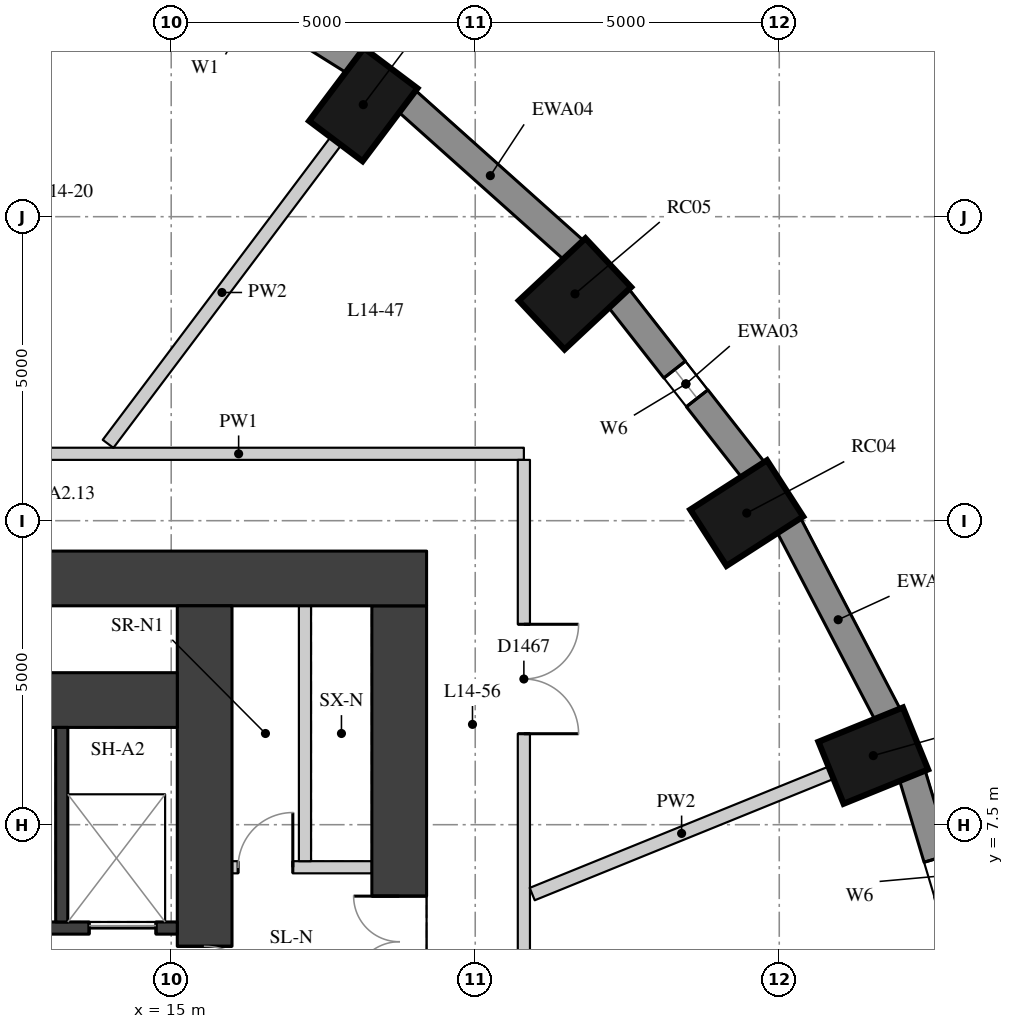
"""IFC4 building model, lengths in metres.
Left out: names, types, materials, properties, quantities, classifications, styles, units other than length and angle.
Written with IfcOpenShell. Run it as: python <this file> out.ifc"""

import sys

from ifc_helpers import new_model, si_unit, direction, frame, frame_2d, origin, origin_2d, place, context, subcontext, project, spatial, rectangle, extrude, element, fill, save


model = new_model("IFC4")
c1 = context("Model", 3, precision=1e-05, world=origin(), true_north=direction((0.0, 1.0)))
c2 = subcontext(c1, "Body", "Model", "MODEL_VIEW")
j1 = project(units=[si_unit("LENGTHUNIT", "METRE"), si_unit("PLANEANGLEUNIT", "RADIAN")], contexts=[c1])
p1 = place(None, origin())
s1 = spatial("IfcSite", under=j1, at=p1, CompositionType="ELEMENT")
p2 = place(p1, origin())
s2 = spatial("IfcBuilding", under=s1, at=p2, CompositionType="ELEMENT")
p3 = place(p2, frame((0.0, 0.0, 54.7)))
s3 = spatial("IfcBuildingStorey", under=s2, at=p3, CompositionType="ELEMENT", Elevation=54.7)
for number, where, z_axis, x_axis in (
    (1, (26.546, 8.636, 0.0), (0.0, 0.0, 1.0), (0.927, 0.376, 0.0)),
    (2, (24.465, 12.625, 0.0), (0.0, 0.0, 1.0), (0.841, 0.541, 0.0)),
    (3, (21.641, 16.23, 0.0), (0.0, 0.0, 1.0), (0.73, 0.683, 0.0)),
    (4, (18.159, 19.343, 0.0), (0.0, 0.0, 1.0), (0.601, 0.799, 0.0)),
):
    element("IfcColumn", number, at=place(p3, frame(where, z_axis=z_axis, x_axis=x_axis)), inside=s3, PredefinedType="COLUMN", context=c2, shape_type="SweptSolid", body=[
        extrude(rectangle(XDim=1.5, YDim=1.1, at=origin_2d()), origin(), (0.0, 0.0, 1.0), 3.3),
    ])
p4 = place(p3, frame((28.182, 4.996, 0.0), z_axis=(0.0, 0.0, 1.0), x_axis=(-0.287064133733, 0.957911364963, 0.0)))
e5 = element("IfcWall", 5, at=p4, inside=s3, PredefinedType="SOLIDWALL", context=c2, shape_type="SweptSolid", body=[
    extrude(rectangle(XDim=3.473, YDim=0.45, at=frame_2d((1.737, 0.0))), origin(), (0.0, 0.0, 1.0), 3.02),
])
p5 = place(p4, frame((1.437, 0.0, 0.4)))
e6 = element("IfcOpeningElement", 6, at=p5, cuts=e5, PredefinedType="OPENING", context=c2, shape_type="SweptSolid", body=[
    extrude(rectangle(XDim=0.6, YDim=1.75, at=frame_2d((0.3, 0.875))), frame((0.0, 0.235, 0.0), z_axis=(0.0, -1.0, 0.0), x_axis=(1.0, 0.0, 0.0)), (0.0, 0.0, 1.0), 0.47),
])
p6 = place(p3, frame((26.786, 9.305, 0.0), z_axis=(0.0, 0.0, 1.0), x_axis=(-0.462492775226, 0.886623050041, 0.0)))
e7 = element("IfcWall", 7, at=p6, inside=s3, PredefinedType="SOLIDWALL", context=c2, shape_type="SweptSolid", body=[
    extrude(rectangle(XDim=3.532, YDim=0.45, at=frame_2d((1.766, 0.0))), origin(), (0.0, 0.0, 1.0), 3.02),
])
p7 = place(p3, frame((24.578, 13.328, 0.0), z_axis=(0.0, 0.0, 1.0), x_axis=(-0.616661975264, 0.787228053529, 0.0)))
e8 = element("IfcWall", 8, at=p7, inside=s3, PredefinedType="SOLIDWALL", context=c2, shape_type="SweptSolid", body=[
    extrude(rectangle(XDim=3.61, YDim=0.45, at=frame_2d((1.805, 0.0))), origin(), (0.0, 0.0, 1.0), 3.02),
])
p8 = place(p7, frame((1.505, 0.0, 0.4)))
e9 = element("IfcOpeningElement", 9, at=p8, cuts=e8, PredefinedType="OPENING", context=c2, shape_type="SweptSolid", body=[
    extrude(rectangle(XDim=0.6, YDim=1.75, at=frame_2d((0.3, 0.875))), frame((0.0, 0.235, 0.0), z_axis=(0.0, -1.0, 0.0), x_axis=(1.0, 0.0, 0.0)), (0.0, 0.0, 1.0), 0.47),
])
p9 = place(p3, frame((21.627, 16.943, 0.0), z_axis=(0.0, 0.0, 1.0), x_axis=(-0.745526233716, 0.66647628228, 0.0)))
e10 = element("IfcWall", 10, at=p9, inside=s3, PredefinedType="SOLIDWALL", context=c2, shape_type="SweptSolid", body=[
    extrude(rectangle(XDim=3.697, YDim=0.45, at=frame_2d((1.848, 0.0))), origin(), (0.0, 0.0, 1.0), 3.02),
])
p10 = place(p3, frame((18.023, 20.044, 0.0), z_axis=(0.0, 0.0, 1.0), x_axis=(-0.847635480093, 0.530579016629, 0.0)))
e11 = element("IfcWall", 11, at=p10, inside=s3, PredefinedType="SOLIDWALL", context=c2, shape_type="SweptSolid", body=[
    extrude(rectangle(XDim=3.782, YDim=0.45, at=frame_2d((1.891, 0.0))), origin(), (0.0, 0.0, 1.0), 3.02),
])
p11 = place(p10, frame((0.791, 0.0, 0.4)))
e12 = element("IfcOpeningElement", 12, at=p11, cuts=e11, PredefinedType="OPENING", context=c2, shape_type="SweptSolid", body=[
    extrude(rectangle(XDim=2.2, YDim=1.75, at=frame_2d((1.1, 0.875))), frame((0.0, 0.235, 0.0), z_axis=(0.0, -1.0, 0.0), x_axis=(1.0, 0.0, 0.0)), (0.0, 0.0, 1.0), 0.47),
])
p12 = place(p3, frame((18.75, -11.1, 0.0), z_axis=(0.0, 0.0, 1.0), x_axis=(0.0, 1.0, 0.0)))
e13 = element("IfcWall", 13, at=p12, inside=s3, PredefinedType="SHEAR", context=c2, shape_type="SweptSolid", body=[
    extrude(rectangle(XDim=22.2, YDim=0.9, at=frame_2d((11.1, 0.0))), origin(), (0.0, 0.0, 1.0), 3.02),
])
p13 = place(p12, frame((15.925, 0.0, 0.0)))
e14 = element("IfcOpeningElement", 14, at=p13, cuts=e13, PredefinedType="OPENING", context=c2, shape_type="SweptSolid", body=[
    extrude(rectangle(XDim=1.5, YDim=2.1, at=frame_2d((0.75, 1.05))), frame((0.0, 0.46, 0.0), z_axis=(0.0, -1.0, 0.0), x_axis=(1.0, 0.0, 0.0)), (0.0, 0.0, 1.0), 0.92),
])
p14 = place(p12, frame((4.525, 0.0, 0.0)))
e15 = element("IfcOpeningElement", 15, at=p14, cuts=e13, PredefinedType="OPENING", context=c2, shape_type="SweptSolid", body=[
    extrude(rectangle(XDim=1.5, YDim=2.1, at=frame_2d((0.75, 1.05))), frame((0.0, 0.46, 0.0), z_axis=(0.0, -1.0, 0.0), x_axis=(1.0, 0.0, 0.0)), (0.0, 0.0, 1.0), 0.92),
])
p15 = place(p3, frame((4.0, 11.55, 0.0), z_axis=(0.0, 0.0, 1.0), x_axis=(1.0, 0.0, 0.0)))
e16 = element("IfcWall", 16, at=p15, inside=s3, PredefinedType="SHEAR", context=c2, shape_type="SweptSolid", body=[
    extrude(rectangle(XDim=15.2, YDim=0.9, at=frame_2d((7.6, 0.0))), origin(), (0.0, 0.0, 1.0), 3.02),
])
p16 = place(p3, frame((15.55, -11.1, 0.0), z_axis=(0.0, 0.0, 1.0), x_axis=(0.0, 1.0, 0.0)))
e17 = element("IfcWall", 17, at=p16, inside=s3, PredefinedType="SHEAR", context=c2, shape_type="SweptSolid", body=[
    extrude(rectangle(XDim=22.2, YDim=0.9, at=frame_2d((11.1, 0.0))), origin(), (0.0, 0.0, 1.0), 3.02),
])
p17 = place(p16, frame((15.6, 0.0, 0.0)))
e18 = element("IfcOpeningElement", 18, at=p17, cuts=e17, PredefinedType="OPENING", context=c2, shape_type="SweptSolid", body=[
    extrude(rectangle(XDim=1.0, YDim=2.1, at=frame_2d((0.5, 1.05))), frame((0.0, 0.46, 0.0), z_axis=(0.0, -1.0, 0.0), x_axis=(1.0, 0.0, 0.0)), (0.0, 0.0, 1.0), 0.92),
])
p18 = place(p16, frame((5.6, 0.0, 0.0)))
e19 = element("IfcOpeningElement", 19, at=p18, cuts=e17, PredefinedType="OPENING", context=c2, shape_type="SweptSolid", body=[
    extrude(rectangle(XDim=1.0, YDim=2.1, at=frame_2d((0.5, 1.05))), frame((0.0, 0.46, 0.0), z_axis=(0.0, -1.0, 0.0), x_axis=(1.0, 0.0, 0.0)), (0.0, 0.0, 1.0), 0.92),
])
p19 = place(p3, frame((4.9, 9.55, 0.0), z_axis=(0.0, 0.0, 1.0), x_axis=(1.0, 0.0, 0.0)))
e20 = element("IfcWall", 20, at=p19, inside=s3, PredefinedType="SHEAR", context=c2, shape_type="SweptSolid", body=[
    extrude(rectangle(XDim=10.2, YDim=0.9, at=frame_2d((5.1, 0.0))), origin(), (0.0, 0.0, 1.0), 3.02),
])
p20 = place(p3, frame((4.9, 5.8, 0.0), z_axis=(0.0, 0.0, 1.0), x_axis=(1.0, 0.0, 0.0)))
e21 = element("IfcWall", 21, at=p20, inside=s3, PredefinedType="SHEAR", context=c2, shape_type="SweptSolid", body=[
    extrude(rectangle(XDim=10.2, YDim=0.2, at=frame_2d((5.1, 0.0))), origin(), (0.0, 0.0, 1.0), 3.02),
])
p21 = place(p20, frame((6.75, 0.0, 0.0)))
e22 = element("IfcOpeningElement", 22, at=p21, cuts=e21, PredefinedType="OPENING", context=c2, shape_type="SweptSolid", body=[
    extrude(rectangle(XDim=1.1, YDim=2.1, at=frame_2d((0.55, 1.05))), frame((0.0, 0.11, 0.0), z_axis=(0.0, -1.0, 0.0), x_axis=(1.0, 0.0, 0.0)), (0.0, 0.0, 1.0), 0.22),
])
p22 = place(p20, frame((8.75, 0.0, 0.0)))
e23 = element("IfcOpeningElement", 23, at=p22, cuts=e21, PredefinedType="OPENING", context=c2, shape_type="SweptSolid", body=[
    extrude(rectangle(XDim=1.1, YDim=2.1, at=frame_2d((0.55, 1.05))), frame((0.0, 0.11, 0.0), z_axis=(0.0, -1.0, 0.0), x_axis=(1.0, 0.0, 0.0)), (0.0, 0.0, 1.0), 0.22),
])
p23 = place(p3, frame((13.2, 5.9, 0.0), z_axis=(0.0, 0.0, 1.0), x_axis=(0.0, 1.0, 0.0)))
e24 = element("IfcWall", 24, at=p23, inside=s3, PredefinedType="SHEAR", context=c2, shape_type="SweptSolid", body=[
    extrude(rectangle(XDim=3.2, YDim=0.2, at=frame_2d((1.6, 0.0))), origin(), (0.0, 0.0, 1.0), 3.02),
])
p24 = place(p3, frame((16.0, 6.8, 0.0), z_axis=(0.0, 0.0, 1.0), x_axis=(1.0, 0.0, 0.0)))
e25 = element("IfcWall", 25, at=p24, inside=s3, PredefinedType="PARTITIONING", context=c2, shape_type="SweptSolid", body=[
    extrude(rectangle(XDim=2.3, YDim=0.2, at=frame_2d((1.15, 0.0))), origin(), (0.0, 0.0, 1.0), 3.02),
])
p25 = place(p24, frame((0.1, 0.0, 0.0)))
e26 = element("IfcOpeningElement", 26, at=p25, cuts=e25, PredefinedType="OPENING", context=c2, shape_type="SweptSolid", body=[
    extrude(rectangle(XDim=0.9, YDim=2.1, at=frame_2d((0.45, 1.05))), frame((0.0, 0.11, 0.0), z_axis=(0.0, -1.0, 0.0), x_axis=(1.0, 0.0, 0.0)), (0.0, 0.0, 1.0), 0.22),
])
p26 = place(p3, frame((17.2, 6.9, 0.0), z_axis=(0.0, 0.0, 1.0), x_axis=(0.0, 1.0, 0.0)))
e27 = element("IfcWall", 27, at=p26, inside=s3, PredefinedType="PARTITIONING", context=c2, shape_type="SweptSolid", body=[
    extrude(rectangle(XDim=4.2, YDim=0.2, at=frame_2d((2.1, 0.0))), origin(), (0.0, 0.0, 1.0), 3.02),
])
p27 = place(p3, frame((11.418, 13.6, 0.0), z_axis=(0.0, 0.0, 1.0), x_axis=(1.0, 0.0, 0.0)))
e28 = element("IfcWall", 28, at=p27, inside=s3, PredefinedType="PARTITIONING", context=c2, shape_type="SweptSolid", body=[
    extrude(rectangle(XDim=9.382, YDim=0.2, at=frame_2d((4.691, 0.0))), origin(), (0.0, 0.0, 1.0), 3.02),
])
p28 = place(p3, frame((20.8, 13.5, 0.0), z_axis=(0.0, 0.0, 1.0), x_axis=(0.0, -1.0, 0.0)))
e29 = element("IfcWall", 29, at=p28, inside=s3, PredefinedType="PARTITIONING", context=c2, shape_type="SweptSolid", body=[
    extrude(rectangle(XDim=27.1, YDim=0.2, at=frame_2d((13.55, 0.0))), origin(), (0.0, 0.0, 1.0), 3.02),
])
p29 = place(p28, frame((17.733, 0.0, 0.0)))
e30 = element("IfcOpeningElement", 30, at=p29, cuts=e29, PredefinedType="OPENING", context=c2, shape_type="SweptSolid", body=[
    extrude(rectangle(XDim=1.8, YDim=2.1, at=frame_2d((0.9, 1.05))), frame((0.0, 0.11, 0.0), z_axis=(0.0, -1.0, 0.0), x_axis=(1.0, 0.0, 0.0)), (0.0, 0.0, 1.0), 0.22),
])
p30 = place(p28, frame((9.448, 0.0, 0.0)))
e31 = element("IfcOpeningElement", 31, at=p30, cuts=e29, PredefinedType="OPENING", context=c2, shape_type="SweptSolid", body=[
    extrude(rectangle(XDim=1.8, YDim=2.1, at=frame_2d((0.9, 1.05))), frame((0.0, 0.11, 0.0), z_axis=(0.0, -1.0, 0.0), x_axis=(1.0, 0.0, 0.0)), (0.0, 0.0, 1.0), 0.22),
])
p31 = place(p28, frame((2.704, 0.0, 0.0)))
e32 = element("IfcOpeningElement", 32, at=p31, cuts=e29, PredefinedType="OPENING", context=c2, shape_type="SweptSolid", body=[
    extrude(rectangle(XDim=1.8, YDim=2.1, at=frame_2d((0.9, 1.05))), frame((0.0, 0.11, 0.0), z_axis=(0.0, -1.0, 0.0), x_axis=(1.0, 0.0, 0.0)), (0.0, 0.0, 1.0), 0.22),
])
p32 = place(p3, frame((25.851, 8.354, 0.0), z_axis=(0.0, 0.0, 1.0), x_axis=(-0.926546814299, -0.376179479653, 0.0)))
e33 = element("IfcWall", 33, at=p32, inside=s3, PredefinedType="PARTITIONING", context=c2, shape_type="SweptSolid", body=[
    extrude(rectangle(XDim=5.304, YDim=0.22, at=frame_2d((2.652, 0.0))), origin(), (0.0, 0.0, 1.0), 3.02),
])
p33 = place(p3, frame((17.708, 18.743, 0.0), z_axis=(0.0, 0.0, 1.0), x_axis=(-0.601177883261, -0.799115231164, 0.0)))
e34 = element("IfcWall", 34, at=p33, inside=s3, PredefinedType="PARTITIONING", context=c2, shape_type="SweptSolid", body=[
    extrude(rectangle(XDim=6.231, YDim=0.22, at=frame_2d((3.116, 0.0))), origin(), (0.0, 0.0, 1.0), 3.02),
])
p34 = place(p5, origin())
e35 = element("IfcWindow", 35, at=p34, inside=s3, PartitioningType="SINGLE_PANEL", PredefinedType="WINDOW", context=c2, shape_type="SweptSolid", body=[
    extrude(rectangle(XDim=0.6, YDim=1.75, at=frame_2d((0.3, 0.875))), frame((0.0, 0.035, 0.0), z_axis=(0.0, -1.0, 0.0), x_axis=(1.0, 0.0, 0.0)), (0.0, 0.0, 1.0), 0.06),
])
fill(e6, e35)
p35 = place(p8, origin())
e36 = element("IfcWindow", 36, at=p35, inside=s3, PartitioningType="SINGLE_PANEL", PredefinedType="WINDOW", context=c2, shape_type="SweptSolid", body=[
    extrude(rectangle(XDim=0.6, YDim=1.75, at=frame_2d((0.3, 0.875))), frame((0.0, 0.035, 0.0), z_axis=(0.0, -1.0, 0.0), x_axis=(1.0, 0.0, 0.0)), (0.0, 0.0, 1.0), 0.06),
])
fill(e9, e36)
p36 = place(p13, origin())
e37 = element("IfcDoor", 37, at=p36, inside=s3, OperationType="DOUBLE_DOOR_SINGLE_SWING", PredefinedType="DOOR", context=c2, shape_type="SweptSolid", body=[
    extrude(rectangle(XDim=1.5, YDim=2.1, at=frame_2d((0.75, 1.05))), frame((0.0, 0.025, 0.0), z_axis=(0.0, -1.0, 0.0), x_axis=(1.0, 0.0, 0.0)), (0.0, 0.0, 1.0), 0.05),
])
fill(e14, e37)
p37 = place(p22, origin())
e38 = element("IfcDoor", 38, at=p37, inside=s3, OperationType="DOUBLE_DOOR_SLIDING", PredefinedType="DOOR", context=c2, shape_type="SweptSolid", body=[
    extrude(rectangle(XDim=1.1, YDim=2.1, at=frame_2d((0.55, 1.05))), frame((0.0, 0.025, 0.0), z_axis=(0.0, -1.0, 0.0), x_axis=(1.0, 0.0, 0.0)), (0.0, 0.0, 1.0), 0.05),
])
fill(e23, e38)
p38 = place(p17, origin())
e39 = element("IfcDoor", 39, at=p38, inside=s3, OperationType="SINGLE_SWING_RIGHT", PredefinedType="DOOR", context=c2, shape_type="SweptSolid", body=[
    extrude(rectangle(XDim=1.0, YDim=2.1, at=frame_2d((0.5, 1.05))), frame((0.0, 0.025, 0.0), z_axis=(0.0, -1.0, 0.0), x_axis=(1.0, 0.0, 0.0)), (0.0, 0.0, 1.0), 0.05),
])
fill(e18, e39)
p39 = place(p25, origin())
e40 = element("IfcDoor", 40, at=p39, inside=s3, OperationType="SINGLE_SWING_RIGHT", PredefinedType="DOOR", context=c2, shape_type="SweptSolid", body=[
    extrude(rectangle(XDim=0.9, YDim=2.1, at=frame_2d((0.45, 1.05))), frame((0.0, 0.025, 0.0), z_axis=(0.0, -1.0, 0.0), x_axis=(1.0, 0.0, 0.0)), (0.0, 0.0, 1.0), 0.05),
])
fill(e26, e40)
p40 = place(p31, origin())
e41 = element("IfcDoor", 41, at=p40, inside=s3, OperationType="DOUBLE_DOOR_SINGLE_SWING", PredefinedType="DOOR", context=c2, shape_type="SweptSolid", body=[
    extrude(rectangle(XDim=1.8, YDim=2.1, at=frame_2d((0.9, 1.05))), frame((0.0, 0.025, 0.0), z_axis=(0.0, -1.0, 0.0), x_axis=(1.0, 0.0, 0.0)), (0.0, 0.0, 1.0), 0.05),
])
fill(e32, e41)
save(model, sys.argv[1])
